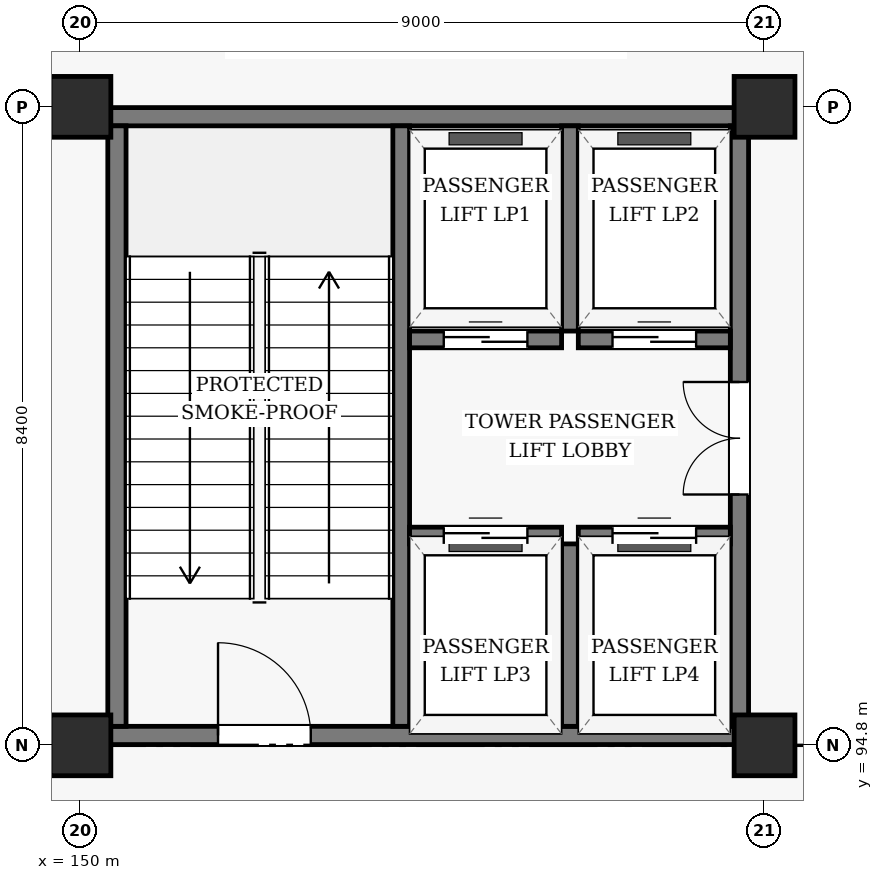
"""IFC4 building model, lengths in metres.
Left out: names, types, materials, properties, quantities, classifications, styles, units other than length and angle.
Written with IfcOpenShell. Run it as: python <this file> out.ifc"""

import sys

from ifc_helpers import new_model, si_unit, direction, frame, frame_2d, origin, origin_2d, place, context, subcontext, project, spatial, rectangle, extrude, element, fill, save


model = new_model("IFC4")
c1 = context("Model", 3, precision=1e-05, world=origin(), true_north=direction((0.0, 1.0)))
c2 = subcontext(c1, "Body", "Model", "MODEL_VIEW")
j1 = project(units=[si_unit("LENGTHUNIT", "METRE"), si_unit("PLANEANGLEUNIT", "RADIAN")], contexts=[c1])
p1 = place(None, origin())
s1 = spatial("IfcSite", under=j1, at=p1, CompositionType="ELEMENT")
p2 = place(p1, origin())
s2 = spatial("IfcBuilding", under=s1, at=p2, CompositionType="ELEMENT")
p3 = place(p2, frame((0.0, 0.0, -4.8)))
s3 = spatial("IfcBuildingStorey", under=s2, at=p3, CompositionType="ELEMENT", Elevation=-4.8)
for number, where, z_axis, x_axis in (
    (1, (150.0, 94.8, 0.0), (0.0, 0.0, 1.0), (1.0, 0.0, 0.0)),
    (2, (150.0, 103.2, 0.0), (0.0, 0.0, 1.0), (1.0, 0.0, 0.0)),
    (3, (159.0, 94.8, 0.0), (0.0, 0.0, 1.0), (1.0, 0.0, 0.0)),
    (4, (159.0, 103.2, 0.0), (0.0, 0.0, 1.0), (1.0, 0.0, 0.0)),
):
    element("IfcColumn", number, at=place(p3, frame(where, z_axis=z_axis, x_axis=x_axis)), inside=s3, PredefinedType="COLUMN", context=c2, shape_type="SweptSolid", body=[
        extrude(rectangle(XDim=0.8, YDim=0.8, at=origin_2d()), origin(), (0.0, 0.0, 1.0), 4.8),
    ])
p4 = place(p3, frame((150.02, 94.93, 0.0), z_axis=(0.0, 0.0, 1.0), x_axis=(1.0, 0.0, 0.0)))
e5 = element("IfcWall", 5, at=p4, inside=s3, PredefinedType="SHEAR", context=c2, shape_type="SweptSolid", body=[
    extrude(rectangle(XDim=8.77, YDim=0.24, at=frame_2d((4.385, 0.0))), origin(), (0.0, 0.0, 1.0), 4.54),
])
p5 = place(p4, frame((1.79, 0.0, 0.0)))
e6 = element("IfcOpeningElement", 6, at=p5, cuts=e5, PredefinedType="OPENING", context=c2, shape_type="SweptSolid", body=[
    extrude(rectangle(XDim=1.22, YDim=2.18, at=frame_2d((0.61, 1.09))), frame((0.0, 0.13, 0.0), z_axis=(0.0, -1.0, 0.0), x_axis=(1.0, 0.0, 0.0)), (0.0, 0.0, 1.0), 0.26),
])
p6 = place(p3, frame((150.02, 103.07, 0.0), z_axis=(0.0, 0.0, 1.0), x_axis=(1.0, 0.0, 0.0)))
e7 = element("IfcWall", 7, at=p6, inside=s3, PredefinedType="SHEAR", context=c2, shape_type="SweptSolid", body=[
    extrude(rectangle(XDim=8.77, YDim=0.24, at=frame_2d((4.385, 0.0))), origin(), (0.0, 0.0, 1.0), 4.54),
])
p7 = place(p3, frame((150.48, 95.05, 0.0), z_axis=(0.0, 0.0, 1.0), x_axis=(0.0, 1.0, 0.0)))
e8 = element("IfcWall", 8, at=p7, inside=s3, PredefinedType="SHEAR", context=c2, shape_type="SweptSolid", body=[
    extrude(rectangle(XDim=7.9, YDim=0.24, at=frame_2d((3.95, 0.0))), origin(), (0.0, 0.0, 1.0), 4.54),
])
p8 = place(p3, frame((154.22, 95.05, 0.0), z_axis=(0.0, 0.0, 1.0), x_axis=(0.0, 1.0, 0.0)))
e9 = element("IfcWall", 9, at=p8, inside=s3, PredefinedType="SHEAR", context=c2, shape_type="SweptSolid", body=[
    extrude(rectangle(XDim=7.9, YDim=0.22, at=frame_2d((3.95, 0.0))), origin(), (0.0, 0.0, 1.0), 4.54),
])
p9 = place(p3, frame((158.67, 95.05, 0.0), z_axis=(0.0, 0.0, 1.0), x_axis=(0.0, 1.0, 0.0)))
e10 = element("IfcWall", 10, at=p9, inside=s3, PredefinedType="SHEAR", context=c2, shape_type="SweptSolid", body=[
    extrude(rectangle(XDim=7.9, YDim=0.24, at=frame_2d((3.95, 0.0))), origin(), (0.0, 0.0, 1.0), 4.54),
])
p10 = place(p9, frame((3.05, 0.0, 0.0)))
e11 = element("IfcOpeningElement", 11, at=p10, cuts=e10, PredefinedType="OPENING", context=c2, shape_type="SweptSolid", body=[
    extrude(rectangle(XDim=1.48, YDim=2.22, at=frame_2d((0.74, 1.11))), frame((0.0, 0.13, 0.0), z_axis=(0.0, -1.0, 0.0), x_axis=(1.0, 0.0, 0.0)), (0.0, 0.0, 1.0), 0.26),
])
p11 = place(p3, frame((156.44, 100.25, 0.0), z_axis=(0.0, 0.0, 1.0), x_axis=(0.0, 1.0, 0.0)))
e12 = element("IfcWall", 12, at=p11, inside=s3, PredefinedType="SHEAR", context=c2, shape_type="SweptSolid", body=[
    extrude(rectangle(XDim=2.7, YDim=0.22, at=frame_2d((1.35, 0.0))), origin(), (0.0, 0.0, 1.0), 4.54),
])
p12 = place(p3, frame((154.33, 100.14, 0.0), z_axis=(0.0, 0.0, 1.0), x_axis=(1.0, 0.0, 0.0)))
e13 = element("IfcWall", 13, at=p12, inside=s3, PredefinedType="SHEAR", context=c2, shape_type="SweptSolid", body=[
    extrude(rectangle(XDim=2.0, YDim=0.22, at=frame_2d((1.0, 0.0))), origin(), (0.0, 0.0, 1.0), 4.54),
])
p13 = place(p12, frame((0.45, 0.0, 0.0)))
e14 = element("IfcOpeningElement", 14, at=p13, cuts=e13, PredefinedType="OPENING", context=c2, shape_type="SweptSolid", body=[
    extrude(rectangle(XDim=1.1, YDim=2.15, at=frame_2d((0.55, 1.075))), frame((0.0, 0.12, 0.0), z_axis=(0.0, -1.0, 0.0), x_axis=(1.0, 0.0, 0.0)), (0.0, 0.0, 1.0), 0.24),
])
p14 = place(p3, frame((156.55, 100.14, 0.0), z_axis=(0.0, 0.0, 1.0), x_axis=(1.0, 0.0, 0.0)))
e15 = element("IfcWall", 15, at=p14, inside=s3, PredefinedType="SHEAR", context=c2, shape_type="SweptSolid", body=[
    extrude(rectangle(XDim=2.0, YDim=0.22, at=frame_2d((1.0, 0.0))), origin(), (0.0, 0.0, 1.0), 4.54),
])
p15 = place(p14, frame((0.45, 0.0, 0.0)))
e16 = element("IfcOpeningElement", 16, at=p15, cuts=e15, PredefinedType="OPENING", context=c2, shape_type="SweptSolid", body=[
    extrude(rectangle(XDim=1.1, YDim=2.15, at=frame_2d((0.55, 1.075))), frame((0.0, 0.12, 0.0), z_axis=(0.0, -1.0, 0.0), x_axis=(1.0, 0.0, 0.0)), (0.0, 0.0, 1.0), 0.24),
])
p16 = place(p3, frame((156.44, 95.05, 0.0), z_axis=(0.0, 0.0, 1.0), x_axis=(0.0, 1.0, 0.0)))
e17 = element("IfcWall", 17, at=p16, inside=s3, PredefinedType="SHEAR", context=c2, shape_type="SweptSolid", body=[
    extrude(rectangle(XDim=2.4, YDim=0.22, at=frame_2d((1.2, 0.0))), origin(), (0.0, 0.0, 1.0), 4.54),
])
p17 = place(p3, frame((154.33, 97.56, 0.0), z_axis=(0.0, 0.0, 1.0), x_axis=(1.0, 0.0, 0.0)))
e18 = element("IfcWall", 18, at=p17, inside=s3, PredefinedType="SHEAR", context=c2, shape_type="SweptSolid", body=[
    extrude(rectangle(XDim=2.0, YDim=0.22, at=frame_2d((1.0, 0.0))), origin(), (0.0, 0.0, 1.0), 4.54),
])
p18 = place(p17, frame((0.45, 0.0, 0.0)))
e19 = element("IfcOpeningElement", 19, at=p18, cuts=e18, PredefinedType="OPENING", context=c2, shape_type="SweptSolid", body=[
    extrude(rectangle(XDim=1.1, YDim=2.15, at=frame_2d((0.55, 1.075))), frame((0.0, 0.12, 0.0), z_axis=(0.0, -1.0, 0.0), x_axis=(1.0, 0.0, 0.0)), (0.0, 0.0, 1.0), 0.24),
])
p19 = place(p3, frame((156.55, 97.56, 0.0), z_axis=(0.0, 0.0, 1.0), x_axis=(1.0, 0.0, 0.0)))
e20 = element("IfcWall", 20, at=p19, inside=s3, PredefinedType="SHEAR", context=c2, shape_type="SweptSolid", body=[
    extrude(rectangle(XDim=2.0, YDim=0.22, at=frame_2d((1.0, 0.0))), origin(), (0.0, 0.0, 1.0), 4.54),
])
p20 = place(p19, frame((0.45, 0.0, 0.0)))
e21 = element("IfcOpeningElement", 21, at=p20, cuts=e20, PredefinedType="OPENING", context=c2, shape_type="SweptSolid", body=[
    extrude(rectangle(XDim=1.1, YDim=2.15, at=frame_2d((0.55, 1.075))), frame((0.0, 0.12, 0.0), z_axis=(0.0, -1.0, 0.0), x_axis=(1.0, 0.0, 0.0)), (0.0, 0.0, 1.0), 0.24),
])
p21 = place(p5, origin())
e22 = element("IfcDoor", 22, at=p21, inside=s3, OperationType="SINGLE_SWING_LEFT", PredefinedType="DOOR", context=c2, shape_type="SweptSolid", body=[
    extrude(rectangle(XDim=1.22, YDim=2.18, at=frame_2d((0.61, 1.09))), frame((0.0, 0.025, 0.0), z_axis=(0.0, -1.0, 0.0), x_axis=(1.0, 0.0, 0.0)), (0.0, 0.0, 1.0), 0.05),
])
fill(e6, e22)
p22 = place(p10, origin())
e23 = element("IfcDoor", 23, at=p22, inside=s3, OperationType="DOUBLE_DOOR_SINGLE_SWING", PredefinedType="DOOR", context=c2, shape_type="SweptSolid", body=[
    extrude(rectangle(XDim=1.48, YDim=2.22, at=frame_2d((0.74, 1.11))), frame((0.0, 0.025, 0.0), z_axis=(0.0, -1.0, 0.0), x_axis=(1.0, 0.0, 0.0)), (0.0, 0.0, 1.0), 0.05),
])
fill(e11, e23)
p23 = place(p13, origin())
e24 = element("IfcDoor", 24, at=p23, inside=s3, OperationType="SLIDING_TO_LEFT", PredefinedType="DOOR", context=c2, shape_type="SweptSolid", body=[
    extrude(rectangle(XDim=1.1, YDim=2.15, at=frame_2d((0.55, 1.075))), frame((0.0, 0.025, 0.0), z_axis=(0.0, -1.0, 0.0), x_axis=(1.0, 0.0, 0.0)), (0.0, 0.0, 1.0), 0.05),
])
fill(e14, e24)
p24 = place(p15, origin())
e25 = element("IfcDoor", 25, at=p24, inside=s3, OperationType="SLIDING_TO_LEFT", PredefinedType="DOOR", context=c2, shape_type="SweptSolid", body=[
    extrude(rectangle(XDim=1.1, YDim=2.15, at=frame_2d((0.55, 1.075))), frame((0.0, 0.025, 0.0), z_axis=(0.0, -1.0, 0.0), x_axis=(1.0, 0.0, 0.0)), (0.0, 0.0, 1.0), 0.05),
])
fill(e16, e25)
p25 = place(p18, origin())
e26 = element("IfcDoor", 26, at=p25, inside=s3, OperationType="SLIDING_TO_LEFT", PredefinedType="DOOR", context=c2, shape_type="SweptSolid", body=[
    extrude(rectangle(XDim=1.1, YDim=2.15, at=frame_2d((0.55, 1.075))), frame((0.0, 0.025, 0.0), z_axis=(0.0, -1.0, 0.0), x_axis=(1.0, 0.0, 0.0)), (0.0, 0.0, 1.0), 0.05),
])
fill(e19, e26)
p26 = place(p20, origin())
e27 = element("IfcDoor", 27, at=p26, inside=s3, OperationType="SLIDING_TO_LEFT", PredefinedType="DOOR", context=c2, shape_type="SweptSolid", body=[
    extrude(rectangle(XDim=1.1, YDim=2.15, at=frame_2d((0.55, 1.075))), frame((0.0, 0.025, 0.0), z_axis=(0.0, -1.0, 0.0), x_axis=(1.0, 0.0, 0.0)), (0.0, 0.0, 1.0), 0.05),
])
fill(e21, e27)
save(model, sys.argv[1])
